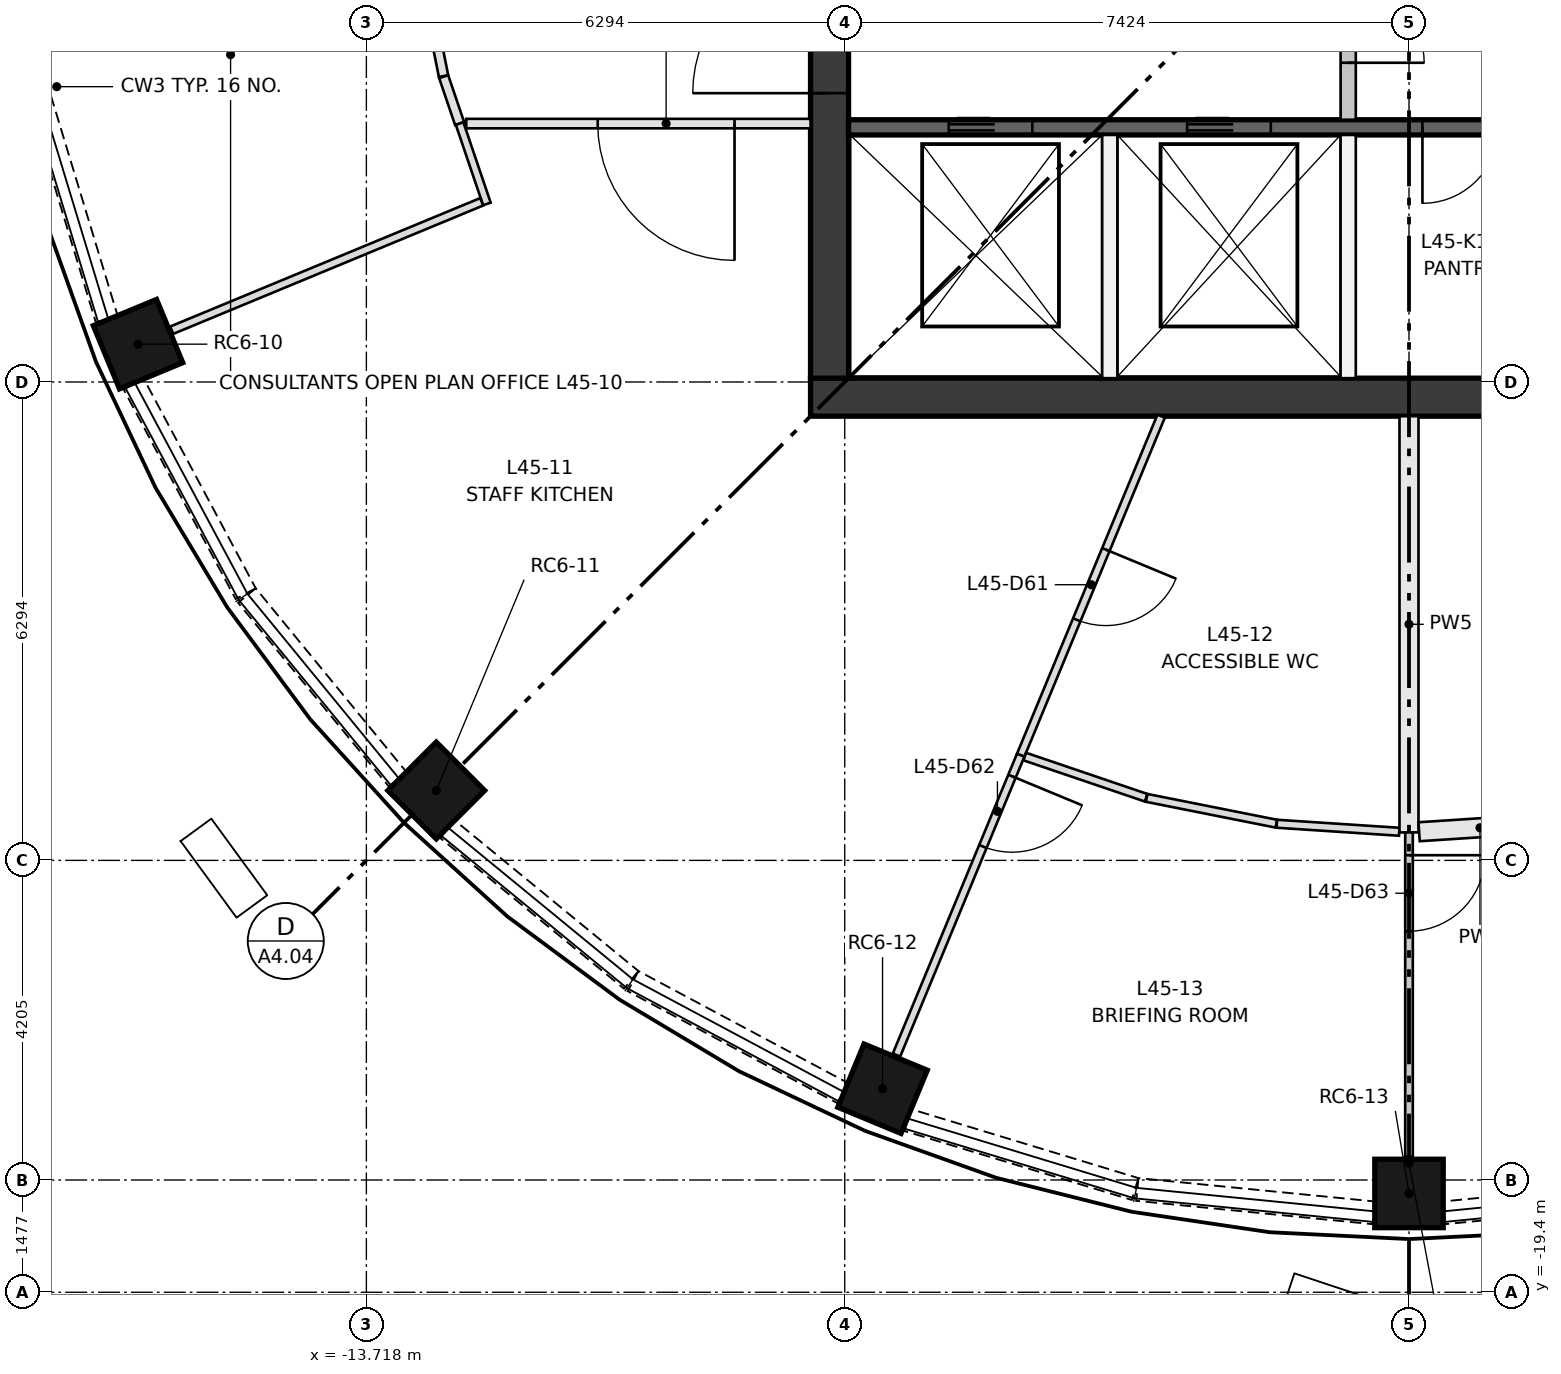
"""IFC4 building model, lengths in metres.
Left out: names, types, materials, properties, quantities, classifications, styles, units other than length and angle.
Written with IfcOpenShell. Run it as: python <this file> out.ifc"""

import sys

from ifc_helpers import new_model, si_unit, direction, frame, frame_2d, origin, origin_2d, place, context, subcontext, project, spatial, rectangle, extrude, element, fill, save


model = new_model("IFC4")
c1 = context("Model", 3, precision=1e-05, world=origin(), true_north=direction((0.0, 1.0)))
c2 = subcontext(c1, "Body", "Model", "MODEL_VIEW")
j1 = project(units=[si_unit("LENGTHUNIT", "METRE"), si_unit("PLANEANGLEUNIT", "RADIAN")], contexts=[c1])
p1 = place(None, origin())
s1 = spatial("IfcSite", under=j1, at=p1, CompositionType="ELEMENT")
p2 = place(p1, origin())
s2 = spatial("IfcBuilding", under=s1, at=p2, CompositionType="ELEMENT")
p3 = place(p2, frame((0.0, 0.0, 170.9)))
s3 = spatial("IfcBuildingStorey", under=s2, at=p3, CompositionType="ELEMENT", Elevation=170.9)
for number, where, z_axis, x_axis in (
    (1, (-16.722, -6.927, 0.0), (0.0, 0.0, 1.0), (-0.924, -0.383, 0.0)),
    (2, (-12.799, -12.799, 0.0), (0.0, 0.0, 1.0), (-0.707, -0.707, 0.0)),
    (3, (-6.927, -16.722, 0.0), (0.0, 0.0, 1.0), (-0.383, -0.924, 0.0)),
    (4, (0.0, -18.1, 0.0), (0.0, 0.0, 1.0), (0.0, -1.0, 0.0)),
):
    element("IfcColumn", number, at=place(p3, frame(where, z_axis=z_axis, x_axis=x_axis)), inside=s3, PredefinedType="COLUMN", context=c2, shape_type="SweptSolid", body=[
        extrude(rectangle(XDim=0.9, YDim=0.9, at=origin_2d()), origin(), (0.0, 0.0, 1.0), 3.35),
    ])
p4 = place(p3, frame((-7.874, -7.624, 0.0), z_axis=(0.0, 0.0, 1.0), x_axis=(1.0, 0.0, 0.0)))
e5 = element("IfcWall", 5, at=p4, inside=s3, PredefinedType="SHEAR", context=c2, shape_type="SweptSolid", body=[
    extrude(rectangle(XDim=15.748, YDim=0.5, at=frame_2d((7.874, 0.0))), origin(), (0.0, 0.0, 1.0), 3.35),
])
p5 = place(p3, frame((-7.624, -7.374, 0.0), z_axis=(0.0, 0.0, 1.0), x_axis=(0.0, 1.0, 0.0)))
e6 = element("IfcWall", 6, at=p5, inside=s3, PredefinedType="SHEAR", context=c2, shape_type="SweptSolid", body=[
    extrude(rectangle(XDim=14.748, YDim=0.5, at=frame_2d((7.374, 0.0))), origin(), (0.0, 0.0, 1.0), 3.35),
])
p6 = place(p5, frame((6.874, 0.0, 0.0)))
e7 = element("IfcOpeningElement", 7, at=p6, cuts=e6, PredefinedType="OPENING", context=c2, shape_type="SweptSolid", body=[
    extrude(rectangle(XDim=1.0, YDim=2.1, at=frame_2d((0.5, 1.05))), frame((0.0, 0.26, 0.0), z_axis=(0.0, -1.0, 0.0), x_axis=(1.0, 0.0, 0.0)), (0.0, 0.0, 1.0), 0.52),
])
p7 = place(p5, frame((3.75, 0.0, 0.0)))
e8 = element("IfcOpeningElement", 8, at=p7, cuts=e6, PredefinedType="OPENING", context=c2, shape_type="SweptSolid", body=[
    extrude(rectangle(XDim=1.8, YDim=2.1, at=frame_2d((0.9, 1.05))), frame((0.0, 0.26, 0.0), z_axis=(0.0, -1.0, 0.0), x_axis=(1.0, 0.0, 0.0)), (0.0, 0.0, 1.0), 0.52),
])
p8 = place(p5, frame((9.198, 0.0, 0.0)))
e9 = element("IfcOpeningElement", 9, at=p8, cuts=e6, PredefinedType="OPENING", context=c2, shape_type="SweptSolid", body=[
    extrude(rectangle(XDim=1.8, YDim=2.1, at=frame_2d((0.9, 1.05))), frame((0.0, 0.26, 0.0), z_axis=(0.0, -1.0, 0.0), x_axis=(1.0, 0.0, 0.0)), (0.0, 0.0, 1.0), 0.52),
])
p9 = place(p3, frame((-7.374, -4.074, 0.0), z_axis=(0.0, 0.0, 1.0), x_axis=(1.0, 0.0, 0.0)))
e10 = element("IfcWall", 10, at=p9, inside=s3, PredefinedType="SHEAR", context=c2, shape_type="SweptSolid", body=[
    extrude(rectangle(XDim=14.748, YDim=0.2, at=frame_2d((7.374, 0.0))), origin(), (0.0, 0.0, 1.0), 3.0),
])
p10 = place(p9, frame((1.319, 0.0, 0.0)))
e11 = element("IfcOpeningElement", 11, at=p10, cuts=e10, PredefinedType="OPENING", context=c2, shape_type="SweptSolid", body=[
    extrude(rectangle(XDim=1.1, YDim=2.1, at=frame_2d((0.55, 1.05))), frame((0.0, 0.11, 0.0), z_axis=(0.0, -1.0, 0.0), x_axis=(1.0, 0.0, 0.0)), (0.0, 0.0, 1.0), 0.22),
])
p11 = place(p9, frame((4.456, 0.0, 0.0)))
e12 = element("IfcOpeningElement", 12, at=p11, cuts=e10, PredefinedType="OPENING", context=c2, shape_type="SweptSolid", body=[
    extrude(rectangle(XDim=1.1, YDim=2.1, at=frame_2d((0.55, 1.05))), frame((0.0, 0.11, 0.0), z_axis=(0.0, -1.0, 0.0), x_axis=(1.0, 0.0, 0.0)), (0.0, 0.0, 1.0), 0.22),
])
p12 = place(p9, frame((7.551, 0.0, 0.0)))
e13 = element("IfcOpeningElement", 13, at=p12, cuts=e10, PredefinedType="OPENING", context=c2, shape_type="SweptSolid", body=[
    extrude(rectangle(XDim=1.0, YDim=2.1, at=frame_2d((0.5, 1.05))), frame((0.0, 0.11, 0.0), z_axis=(0.0, -1.0, 0.0), x_axis=(1.0, 0.0, 0.0)), (0.0, 0.0, 1.0), 0.22),
])
p13 = place(p9, frame((9.914, 0.0, 0.0)))
e14 = element("IfcOpeningElement", 14, at=p13, cuts=e10, PredefinedType="OPENING", context=c2, shape_type="SweptSolid", body=[
    extrude(rectangle(XDim=1.0, YDim=2.1, at=frame_2d((0.5, 1.05))), frame((0.0, 0.11, 0.0), z_axis=(0.0, -1.0, 0.0), x_axis=(1.0, 0.0, 0.0)), (0.0, 0.0, 1.0), 0.22),
])
p14 = place(p9, frame((11.688, 0.0, 0.0)))
e15 = element("IfcOpeningElement", 15, at=p14, cuts=e10, PredefinedType="OPENING", context=c2, shape_type="SweptSolid", body=[
    extrude(rectangle(XDim=1.0, YDim=2.1, at=frame_2d((0.5, 1.05))), frame((0.0, 0.11, 0.0), z_axis=(0.0, -1.0, 0.0), x_axis=(1.0, 0.0, 0.0)), (0.0, 0.0, 1.0), 0.22),
])
p15 = place(p9, frame((13.461, 0.0, 0.0)))
e16 = element("IfcOpeningElement", 16, at=p15, cuts=e10, PredefinedType="OPENING", context=c2, shape_type="SweptSolid", body=[
    extrude(rectangle(XDim=1.0, YDim=2.1, at=frame_2d((0.5, 1.05))), frame((0.0, 0.11, 0.0), z_axis=(0.0, -1.0, 0.0), x_axis=(1.0, 0.0, 0.0)), (0.0, 0.0, 1.0), 0.22),
])
for number, where, z_axis, x_axis in (
    (17, (-3.937, -7.374, 0.0), (0.0, 0.0, 1.0), (0.0, 1.0, 0.0)),
    (18, (-0.8, -7.374, 0.0), (0.0, 0.0, 1.0), (0.0, 1.0, 0.0)),
):
    element("IfcWall", number, at=place(p3, frame(where, z_axis=z_axis, x_axis=x_axis)), inside=s3, PredefinedType="PARTITIONING", context=c2, shape_type="SweptSolid", body=[
        extrude(rectangle(XDim=3.2, YDim=0.2, at=frame_2d((1.6, 0.0))), origin(), (0.0, 0.0, 1.0), 3.0),
    ])
p16 = place(p3, frame((-0.8, -3.974, 0.0), z_axis=(0.0, 0.0, 1.0), x_axis=(0.0, 1.0, 0.0)))
e19 = element("IfcWall", 19, at=p16, inside=s3, PredefinedType="PARTITIONING", context=c2, shape_type="SweptSolid", body=[
    extrude(rectangle(XDim=2.499, YDim=0.2, at=frame_2d((1.25, 0.0))), origin(), (0.0, 0.0, 1.0), 3.0),
])
p17 = place(p16, frame((0.75, 0.0, 0.0)))
e20 = element("IfcOpeningElement", 20, at=p17, cuts=e19, PredefinedType="OPENING", context=c2, shape_type="SweptSolid", body=[
    extrude(rectangle(XDim=1.0, YDim=2.1, at=frame_2d((0.5, 1.05))), frame((0.0, 0.11, 0.0), z_axis=(0.0, -1.0, 0.0), x_axis=(1.0, 0.0, 0.0)), (0.0, 0.0, 1.0), 0.22),
])
p18 = place(p3, frame((-18.042, -3.604, 0.0), z_axis=(0.0, 0.0, 1.0), x_axis=(0.290083245834, -0.957001416136, 0.0)))
e21 = element("IfcWall", 21, at=p18, inside=s3, PredefinedType="SOLIDWALL", context=c2, shape_type="SweptSolid", body=[
    extrude(rectangle(XDim=3.127, YDim=0.3, at=frame_2d((1.563, 0.0))), origin(), (0.0, 0.0, 1.0), 0.9),
])
p19 = place(p3, frame((-16.779, -7.452, 0.0), z_axis=(0.0, 0.0, 1.0), x_axis=(0.47120441036, -0.882024038027, 0.0)))
e22 = element("IfcWall", 22, at=p19, inside=s3, PredefinedType="SOLIDWALL", context=c2, shape_type="SweptSolid", body=[
    extrude(rectangle(XDim=3.125, YDim=0.3, at=frame_2d((1.562, 0.0))), origin(), (0.0, 0.0, 1.0), 0.9),
])
for number, where, z_axis, x_axis in (
    (23, (-15.29, -10.234, 0.0), (0.0, 0.0, 1.0), (0.634, -0.773, 0.0)),
    (24, (-12.651, -13.306, 0.0), (0.0, 0.0, 1.0), (0.773, -0.634, 0.0)),
):
    element("IfcWall", number, at=place(p3, frame(where, z_axis=z_axis, x_axis=x_axis)), inside=s3, PredefinedType="SOLIDWALL", context=c2, shape_type="SweptSolid", body=[
        extrude(rectangle(XDim=3.127, YDim=0.3, at=frame_2d((1.563, 0.0))), origin(), (0.0, 0.0, 1.0), 0.9),
    ])
p20 = place(p3, frame((-10.209, -15.306, 0.0), z_axis=(0.0, 0.0, 1.0), x_axis=(0.882024038027, -0.47120441036, 0.0)))
e25 = element("IfcWall", 25, at=p20, inside=s3, PredefinedType="SOLIDWALL", context=c2, shape_type="SweptSolid", body=[
    extrude(rectangle(XDim=3.125, YDim=0.3, at=frame_2d((1.562, 0.0))), origin(), (0.0, 0.0, 1.0), 0.9),
])
p21 = place(p3, frame((-6.596, -17.135, 0.0), z_axis=(0.0, 0.0, 1.0), x_axis=(0.957001416136, -0.290083245834, 0.0)))
e26 = element("IfcWall", 26, at=p21, inside=s3, PredefinedType="SOLIDWALL", context=c2, shape_type="SweptSolid", body=[
    extrude(rectangle(XDim=3.127, YDim=0.3, at=frame_2d((1.563, 0.0))), origin(), (0.0, 0.0, 1.0), 0.9),
])
for number, where, z_axis, x_axis in (
    (27, (-3.574, -18.048, 0.0), (0.0, 0.0, 1.0), (0.995, -0.098, 0.0)),
    (28, (0.464, -18.354, 0.0), (0.0, 0.0, 1.0), (0.995, 0.098, 0.0)),
):
    element("IfcWall", number, at=place(p3, frame(where, z_axis=z_axis, x_axis=x_axis)), inside=s3, PredefinedType="SOLIDWALL", context=c2, shape_type="SweptSolid", body=[
        extrude(rectangle(XDim=3.125, YDim=0.3, at=frame_2d((1.563, 0.0))), origin(), (0.0, 0.0, 1.0), 0.9),
    ])
p22 = place(p3, frame((-12.703, -3.399, 0.0), z_axis=(0.0, 0.0, 1.0), x_axis=(-0.195101249107, 0.980783106806, 0.0)))
e29 = element("IfcWall", 29, at=p22, inside=s3, PredefinedType="PARTITIONING", context=c2, shape_type="SweptSolid", body=[
    extrude(rectangle(XDim=1.712, YDim=0.125, at=frame_2d((0.856, 0.0))), origin(), (0.0, 0.0, 1.0), 3.0),
])
p23 = place(p22, frame((0.4, 0.0, 0.0)))
e30 = element("IfcOpeningElement", 30, at=p23, cuts=e29, PredefinedType="OPENING", context=c2, shape_type="SweptSolid", body=[
    extrude(rectangle(XDim=1.0, YDim=2.1, at=frame_2d((0.5, 1.05))), frame((0.0, 0.073, 0.0), z_axis=(0.0, -1.0, 0.0), x_axis=(1.0, 0.0, 0.0)), (0.0, 0.0, 1.0), 0.145),
])
p24 = place(p3, frame((-12.491, -4.024, 0.0), z_axis=(0.0, 0.0, 1.0), x_axis=(-0.321506357846, 0.946907419902, 0.0)))
e31 = element("IfcWall", 31, at=p24, inside=s3, PredefinedType="PARTITIONING", context=c2, shape_type="SweptSolid", body=[
    extrude(rectangle(XDim=0.652, YDim=0.125, at=frame_2d((0.326, 0.0))), origin(), (0.0, 0.0, 1.0), 3.0),
])
p25 = place(p3, frame((-7.874, -4.024, 0.0), z_axis=(0.0, 0.0, 1.0), x_axis=(-1.0, 0.0, 0.0)))
e32 = element("IfcWall", 32, at=p25, inside=s3, PredefinedType="PARTITIONING", context=c2, shape_type="SweptSolid", body=[
    extrude(rectangle(XDim=4.53, YDim=0.125, at=frame_2d((2.265, 0.0))), origin(), (0.0, 0.0, 1.0), 3.0),
])
p26 = place(p25, frame((1.0, 0.0, 0.0)))
e33 = element("IfcOpeningElement", 33, at=p26, cuts=e32, PredefinedType="OPENING", context=c2, shape_type="SweptSolid", body=[
    extrude(rectangle(XDim=1.8, YDim=2.1, at=frame_2d((0.9, 1.05))), frame((0.0, 0.073, 0.0), z_axis=(0.0, -1.0, 0.0), x_axis=(1.0, 0.0, 0.0)), (0.0, 0.0, 1.0), 0.145),
])
p27 = place(p3, frame((-12.491, -4.024, 0.0), z_axis=(0.0, 0.0, 1.0), x_axis=(0.321534356008, -0.946897913139, 0.0)))
e34 = element("IfcWall", 34, at=p27, inside=s3, PredefinedType="PARTITIONING", context=c2, shape_type="SweptSolid", body=[
    extrude(rectangle(XDim=1.117, YDim=0.105, at=frame_2d((0.559, 0.0))), origin(), (0.0, 0.0, 1.0), 3.0),
])
p28 = place(p3, frame((-12.201, -5.054, 0.0), z_axis=(0.0, 0.0, 1.0), x_axis=(-0.923879989031, -0.382682330227, 0.0)))
e35 = element("IfcWall", 35, at=p28, inside=s3, PredefinedType="PARTITIONING", context=c2, shape_type="SweptSolid", body=[
    extrude(rectangle(XDim=4.414, YDim=0.105, at=frame_2d((2.207, 0.0))), origin(), (0.0, 0.0, 1.0), 3.0),
])
p29 = place(p3, frame((-3.261, -7.874, 0.0), z_axis=(0.0, 0.0, 1.0), x_axis=(-0.382707643949, -0.923869503373, 0.0)))
e36 = element("IfcWall", 36, at=p29, inside=s3, PredefinedType="PARTITIONING", context=c2, shape_type="SweptSolid", body=[
    extrude(rectangle(XDim=4.827, YDim=0.105, at=frame_2d((2.414, 0.0))), origin(), (0.0, 0.0, 1.0), 3.0),
])
p30 = place(p29, frame((1.9, 0.0, 0.0)))
e37 = element("IfcOpeningElement", 37, at=p30, cuts=e36, PredefinedType="OPENING", context=c2, shape_type="SweptSolid", body=[
    extrude(rectangle(XDim=1.0, YDim=2.1, at=frame_2d((0.5, 1.05))), frame((0.0, 0.062, 0.0), z_axis=(0.0, -1.0, 0.0), x_axis=(1.0, 0.0, 0.0)), (0.0, 0.0, 1.0), 0.125),
])
p31 = place(p3, frame((-5.109, -12.334, 0.0), z_axis=(0.0, 0.0, 1.0), x_axis=(-0.382669916503, -0.923885130849, 0.0)))
e38 = element("IfcWall", 38, at=p31, inside=s3, PredefinedType="PARTITIONING", context=c2, shape_type="SweptSolid", body=[
    extrude(rectangle(XDim=4.27, YDim=0.105, at=frame_2d((2.135, 0.0))), origin(), (0.0, 0.0, 1.0), 3.0),
])
p32 = place(p31, frame((0.3, 0.0, 0.0)))
e39 = element("IfcOpeningElement", 39, at=p32, cuts=e38, PredefinedType="OPENING", context=c2, shape_type="SweptSolid", body=[
    extrude(rectangle(XDim=1.0, YDim=2.1, at=frame_2d((0.5, 1.05))), frame((0.0, 0.062, 0.0), z_axis=(0.0, -1.0, 0.0), x_axis=(1.0, 0.0, 0.0)), (0.0, 0.0, 1.0), 0.125),
])
p33 = place(p3, frame((-3.458, -12.894, 0.0), z_axis=(0.0, 0.0, 1.0), x_axis=(-0.946917341597, 0.321477134773, 0.0)))
e40 = element("IfcWall", 40, at=p33, inside=s3, PredefinedType="PARTITIONING", context=c2, shape_type="SweptSolid", body=[
    extrude(rectangle(XDim=1.687, YDim=0.105, at=frame_2d((0.843, 0.0))), origin(), (0.0, 0.0, 1.0), 3.0),
])
p34 = place(p3, frame((-1.746, -13.235, 0.0), z_axis=(0.0, 0.0, 1.0), x_axis=(-0.980785270285, 0.195090372882, 0.0)))
e41 = element("IfcWall", 41, at=p34, inside=s3, PredefinedType="PARTITIONING", context=c2, shape_type="SweptSolid", body=[
    extrude(rectangle(XDim=1.74, YDim=0.105, at=frame_2d((0.87, 0.0))), origin(), (0.0, 0.0, 1.0), 3.0),
])
p35 = place(p3, frame((-0.128, -13.342, 0.0), z_axis=(0.0, 0.0, 1.0), x_axis=(-0.997862773684, 0.065344356258, 0.0)))
e42 = element("IfcWall", 42, at=p35, inside=s3, PredefinedType="PARTITIONING", context=c2, shape_type="SweptSolid", body=[
    extrude(rectangle(XDim=1.614, YDim=0.105, at=frame_2d((0.807, 0.0))), origin(), (0.0, 0.0, 1.0), 3.0),
])
p36 = place(p3, frame((0.0, -7.874, 0.0), z_axis=(0.0, 0.0, 1.0), x_axis=(0.0, -1.0, 0.0)))
e43 = element("IfcWall", 43, at=p36, inside=s3, PredefinedType="PARTITIONING", context=c2, shape_type="SweptSolid", body=[
    extrude(rectangle(XDim=5.476, YDim=0.25, at=frame_2d((2.738, 0.0))), origin(), (0.0, 0.0, 1.0), 3.0),
])
p37 = place(p3, frame((0.0, -13.35, 0.0), z_axis=(0.0, 0.0, 1.0), x_axis=(0.0, -1.0, 0.0)))
e44 = element("IfcWall", 44, at=p37, inside=s3, PredefinedType="PARTITIONING", context=c2, shape_type="SweptSolid", body=[
    extrude(rectangle(XDim=4.27, YDim=0.1, at=frame_2d((2.135, 0.0))), origin(), (0.0, 0.0, 1.0), 3.0),
])
p38 = place(p37, frame((0.3, 0.0, 0.0)))
e45 = element("IfcOpeningElement", 45, at=p38, cuts=e44, PredefinedType="OPENING", context=c2, shape_type="SweptSolid", body=[
    extrude(rectangle(XDim=1.0, YDim=2.1, at=frame_2d((0.5, 1.05))), frame((0.0, 0.06, 0.0), z_axis=(0.0, -1.0, 0.0), x_axis=(1.0, 0.0, 0.0)), (0.0, 0.0, 1.0), 0.12),
])
p39 = place(p3, frame((1.734, -13.236, 0.0), z_axis=(0.0, 0.0, 1.0), x_axis=(-0.997857274773, -0.065428275107, 0.0)))
e46 = element("IfcWall", 46, at=p39, inside=s3, PredefinedType="PARTITIONING", context=c2, shape_type="SweptSolid", body=[
    extrude(rectangle(XDim=1.604, YDim=0.25, at=frame_2d((0.802, 0.0))), origin(), (0.0, 0.0, 1.0), 3.0),
])
p40 = place(p10, origin())
e47 = element("IfcDoor", 47, at=p40, inside=s3, OperationType="DOUBLE_DOOR_SLIDING", PredefinedType="DOOR", context=c2, shape_type="SweptSolid", body=[
    extrude(rectangle(XDim=1.1, YDim=2.1, at=frame_2d((0.55, 1.05))), frame((0.0, 0.025, 0.0), z_axis=(0.0, -1.0, 0.0), x_axis=(1.0, 0.0, 0.0)), (0.0, 0.0, 1.0), 0.05),
])
fill(e11, e47)
p41 = place(p11, origin())
e48 = element("IfcDoor", 48, at=p41, inside=s3, OperationType="DOUBLE_DOOR_SLIDING", PredefinedType="DOOR", context=c2, shape_type="SweptSolid", body=[
    extrude(rectangle(XDim=1.1, YDim=2.1, at=frame_2d((0.55, 1.05))), frame((0.0, 0.025, 0.0), z_axis=(0.0, -1.0, 0.0), x_axis=(1.0, 0.0, 0.0)), (0.0, 0.0, 1.0), 0.05),
])
fill(e12, e48)
p42 = place(p17, frame((1.0, 0.0, 0.0), z_axis=(0.0, 0.0, 1.0), x_axis=(-1.0, 0.0, 0.0)))
e49 = element("IfcDoor", 49, at=p42, inside=s3, OperationType="SINGLE_SWING_LEFT", PredefinedType="DOOR", context=c2, shape_type="SweptSolid", body=[
    extrude(rectangle(XDim=1.0, YDim=2.1, at=frame_2d((0.5, 1.05))), frame((0.0, 0.025, 0.0), z_axis=(0.0, -1.0, 0.0), x_axis=(1.0, 0.0, 0.0)), (0.0, 0.0, 1.0), 0.05),
])
fill(e20, e49)
p43 = place(p12, frame((1.0, 0.0, 0.0), z_axis=(0.0, 0.0, 1.0), x_axis=(-1.0, 0.0, 0.0)))
e50 = element("IfcDoor", 50, at=p43, inside=s3, OperationType="SINGLE_SWING_LEFT", PredefinedType="DOOR", context=c2, shape_type="SweptSolid", body=[
    extrude(rectangle(XDim=1.0, YDim=2.1, at=frame_2d((0.5, 1.05))), frame((0.0, 0.025, 0.0), z_axis=(0.0, -1.0, 0.0), x_axis=(1.0, 0.0, 0.0)), (0.0, 0.0, 1.0), 0.05),
])
fill(e13, e50)
p44 = place(p7, origin())
e51 = element("IfcDoor", 51, at=p44, inside=s3, OperationType="DOUBLE_DOOR_SINGLE_SWING", PredefinedType="DOOR", context=c2, shape_type="SweptSolid", body=[
    extrude(rectangle(XDim=1.8, YDim=2.1, at=frame_2d((0.9, 1.05))), frame((0.0, 0.025, 0.0), z_axis=(0.0, -1.0, 0.0), x_axis=(1.0, 0.0, 0.0)), (0.0, 0.0, 1.0), 0.05),
])
fill(e8, e51)
p45 = place(p26, origin())
e52 = element("IfcDoor", 52, at=p45, inside=s3, OperationType="DOUBLE_DOOR_SINGLE_SWING", PredefinedType="DOOR", context=c2, shape_type="SweptSolid", body=[
    extrude(rectangle(XDim=1.8, YDim=2.1, at=frame_2d((0.9, 1.05))), frame((0.0, 0.025, 0.0), z_axis=(0.0, -1.0, 0.0), x_axis=(1.0, 0.0, 0.0)), (0.0, 0.0, 1.0), 0.05),
])
fill(e33, e52)
p46 = place(p30, origin())
e53 = element("IfcDoor", 53, at=p46, inside=s3, OperationType="SINGLE_SWING_LEFT", PredefinedType="DOOR", context=c2, shape_type="SweptSolid", body=[
    extrude(rectangle(XDim=1.0, YDim=2.1, at=frame_2d((0.5, 1.05))), frame((0.0, 0.025, 0.0), z_axis=(0.0, -1.0, 0.0), x_axis=(1.0, 0.0, 0.0)), (0.0, 0.0, 1.0), 0.05),
])
fill(e37, e53)
p47 = place(p32, origin())
e54 = element("IfcDoor", 54, at=p47, inside=s3, OperationType="SINGLE_SWING_LEFT", PredefinedType="DOOR", context=c2, shape_type="SweptSolid", body=[
    extrude(rectangle(XDim=1.0, YDim=2.1, at=frame_2d((0.5, 1.05))), frame((0.0, 0.025, 0.0), z_axis=(0.0, -1.0, 0.0), x_axis=(1.0, 0.0, 0.0)), (0.0, 0.0, 1.0), 0.05),
])
fill(e39, e54)
p48 = place(p38, origin())
e55 = element("IfcDoor", 55, at=p48, inside=s3, OperationType="SINGLE_SWING_LEFT", PredefinedType="DOOR", context=c2, shape_type="SweptSolid", body=[
    extrude(rectangle(XDim=1.0, YDim=2.1, at=frame_2d((0.5, 1.05))), frame((0.0, 0.025, 0.0), z_axis=(0.0, -1.0, 0.0), x_axis=(1.0, 0.0, 0.0)), (0.0, 0.0, 1.0), 0.05),
])
fill(e45, e55)
save(model, sys.argv[1])
